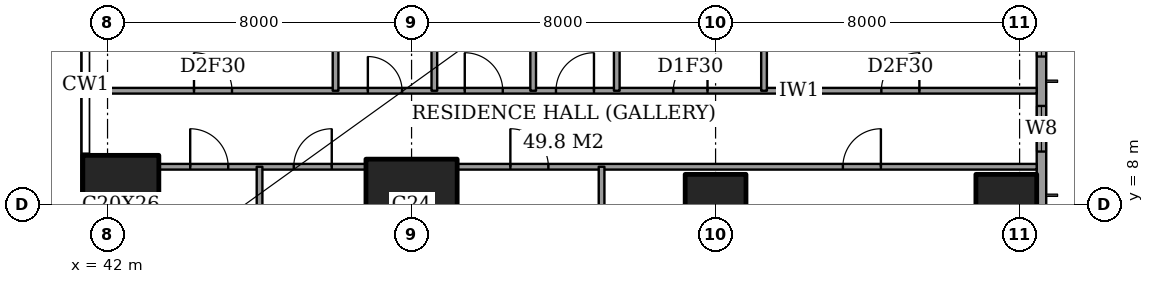
"""IFC4 building model, lengths in metres.
Left out: names, types, materials, properties, quantities, classifications, styles, units other than length and angle.
Written with IfcOpenShell. Run it as: python <this file> out.ifc"""

import sys

from ifc_helpers import new_model, si_unit, direction, frame, frame_2d, origin, origin_2d, place, context, subcontext, project, spatial, rectangle, extrude, element, fill, save


model = new_model("IFC4")
c1 = context("Model", 3, precision=1e-05, world=origin(), true_north=direction((0.0, 1.0)))
c2 = subcontext(c1, "Body", "Model", "MODEL_VIEW")
j1 = project(units=[si_unit("LENGTHUNIT", "METRE"), si_unit("PLANEANGLEUNIT", "RADIAN")], contexts=[c1])
p1 = place(None, origin())
s1 = spatial("IfcSite", under=j1, at=p1, CompositionType="ELEMENT")
p2 = place(p1, origin())
s2 = spatial("IfcBuilding", under=s1, at=p2, CompositionType="ELEMENT")
p3 = place(p2, frame((0.0, 0.0, 237.6)))
s3 = spatial("IfcBuildingStorey", under=s2, at=p3, CompositionType="ELEMENT", Elevation=237.6)
p4 = place(p3, frame((42.35, 8.0, 0.0), z_axis=(0.0, 0.0, 1.0), x_axis=(1.0, 0.0, 0.0)))
e1 = element("IfcColumn", 1, at=p4, inside=s3, PredefinedType="COLUMN", context=c2, shape_type="SweptSolid", body=[
    extrude(rectangle(XDim=2.0, YDim=2.6, at=origin_2d()), origin(), (0.0, 0.0, 1.0), 3.6),
])
p5 = place(p3, frame((50.0, 8.0, 0.0), z_axis=(0.0, 0.0, 1.0), x_axis=(1.0, 0.0, 0.0)))
e2 = element("IfcColumn", 2, at=p5, inside=s3, PredefinedType="COLUMN", context=c2, shape_type="SweptSolid", body=[
    extrude(rectangle(XDim=2.4, YDim=2.4, at=origin_2d()), origin(), (0.0, 0.0, 1.0), 3.6),
])
for number, where, z_axis, x_axis in (
    (3, (58.0, 8.0, 0.0), (0.0, 0.0, 1.0), (1.0, 0.0, 0.0)),
    (4, (65.65, 8.0, 0.0), (0.0, 0.0, 1.0), (1.0, 0.0, 0.0)),
):
    element("IfcColumn", number, at=place(p3, frame(where, z_axis=z_axis, x_axis=x_axis)), inside=s3, PredefinedType="COLUMN", context=c2, shape_type="SweptSolid", body=[
        extrude(rectangle(XDim=1.6, YDim=1.6, at=origin_2d()), origin(), (0.0, 0.0, 1.0), 3.6),
    ])
p6 = place(p3, frame((66.575, 3.175, 0.0), z_axis=(0.0, 0.0, 1.0), x_axis=(0.0, 1.0, 0.0)))
e5 = element("IfcWall", 5, at=p6, inside=s3, PredefinedType="SOLIDWALL", context=c2, shape_type="SweptSolid", body=[
    extrude(rectangle(XDim=41.65, YDim=0.25, at=frame_2d((20.825, 0.0))), origin(), (0.0, 0.0, 1.0), 3.6),
])
p7 = place(p6, frame((0.875, 0.0, 0.6)))
e6 = element("IfcOpeningElement", 6, at=p7, cuts=e5, PredefinedType="OPENING", context=c2, shape_type="SweptSolid", body=[
    extrude(rectangle(XDim=2.4, YDim=2.0, at=frame_2d((1.2, 1.0))), frame((0.0, 0.135, 0.0), z_axis=(0.0, -1.0, 0.0), x_axis=(1.0, 0.0, 0.0)), (0.0, 0.0, 1.0), 0.27),
])
p8 = place(p6, frame((6.225, 0.0, 0.6)))
e7 = element("IfcOpeningElement", 7, at=p8, cuts=e5, PredefinedType="OPENING", context=c2, shape_type="SweptSolid", body=[
    extrude(rectangle(XDim=1.2, YDim=2.0, at=frame_2d((0.6, 1.0))), frame((0.0, 0.135, 0.0), z_axis=(0.0, -1.0, 0.0), x_axis=(1.0, 0.0, 0.0)), (0.0, 0.0, 1.0), 0.27),
])
p9 = place(p6, frame((8.725, 0.0, 0.6)))
e8 = element("IfcOpeningElement", 8, at=p9, cuts=e5, PredefinedType="OPENING", context=c2, shape_type="SweptSolid", body=[
    extrude(rectangle(XDim=2.4, YDim=2.0, at=frame_2d((1.2, 1.0))), frame((0.0, 0.135, 0.0), z_axis=(0.0, -1.0, 0.0), x_axis=(1.0, 0.0, 0.0)), (0.0, 0.0, 1.0), 0.27),
])
p10 = place(p6, frame((15.725, 0.0, 0.6)))
e9 = element("IfcOpeningElement", 9, at=p10, cuts=e5, PredefinedType="OPENING", context=c2, shape_type="SweptSolid", body=[
    extrude(rectangle(XDim=2.4, YDim=2.0, at=frame_2d((1.2, 1.0))), frame((0.0, 0.135, 0.0), z_axis=(0.0, -1.0, 0.0), x_axis=(1.0, 0.0, 0.0)), (0.0, 0.0, 1.0), 0.27),
])
p11 = place(p6, frame((23.525, 0.0, 0.6)))
e10 = element("IfcOpeningElement", 10, at=p11, cuts=e5, PredefinedType="OPENING", context=c2, shape_type="SweptSolid", body=[
    extrude(rectangle(XDim=2.4, YDim=2.0, at=frame_2d((1.2, 1.0))), frame((0.0, 0.135, 0.0), z_axis=(0.0, -1.0, 0.0), x_axis=(1.0, 0.0, 0.0)), (0.0, 0.0, 1.0), 0.27),
])
p12 = place(p6, frame((30.725, 0.0, 0.6)))
e11 = element("IfcOpeningElement", 11, at=p12, cuts=e5, PredefinedType="OPENING", context=c2, shape_type="SweptSolid", body=[
    extrude(rectangle(XDim=2.4, YDim=2.0, at=frame_2d((1.2, 1.0))), frame((0.0, 0.135, 0.0), z_axis=(0.0, -1.0, 0.0), x_axis=(1.0, 0.0, 0.0)), (0.0, 0.0, 1.0), 0.27),
])
p13 = place(p6, frame((34.525, 0.0, 0.6)))
e12 = element("IfcOpeningElement", 12, at=p13, cuts=e5, PredefinedType="OPENING", context=c2, shape_type="SweptSolid", body=[
    extrude(rectangle(XDim=1.2, YDim=2.0, at=frame_2d((0.6, 1.0))), frame((0.0, 0.135, 0.0), z_axis=(0.0, -1.0, 0.0), x_axis=(1.0, 0.0, 0.0)), (0.0, 0.0, 1.0), 0.27),
])
p14 = place(p6, frame((38.375, 0.0, 0.6)))
e13 = element("IfcOpeningElement", 13, at=p14, cuts=e5, PredefinedType="OPENING", context=c2, shape_type="SweptSolid", body=[
    extrude(rectangle(XDim=2.4, YDim=2.0, at=frame_2d((1.2, 1.0))), frame((0.0, 0.135, 0.0), z_axis=(0.0, -1.0, 0.0), x_axis=(1.0, 0.0, 0.0)), (0.0, 0.0, 1.0), 0.27),
])
p15 = place(p3, frame((43.35, 9.0, 0.0), z_axis=(0.0, 0.0, 1.0), x_axis=(1.0, 0.0, 0.0)))
e14 = element("IfcWall", 14, at=p15, inside=s3, PredefinedType="PARTITIONING", context=c2, shape_type="SweptSolid", body=[
    extrude(rectangle(XDim=5.45, YDim=0.15, at=frame_2d((2.725, 0.0))), origin(), (0.0, 0.0, 1.0), 3.35),
])
p16 = place(p15, frame((3.55, 0.0, 0.0)))
e15 = element("IfcOpeningElement", 15, at=p16, cuts=e14, PredefinedType="OPENING", context=c2, shape_type="SweptSolid", body=[
    extrude(rectangle(XDim=1.0, YDim=2.1, at=frame_2d((0.5, 1.05))), frame((0.0, 0.085, 0.0), z_axis=(0.0, -1.0, 0.0), x_axis=(1.0, 0.0, 0.0)), (0.0, 0.0, 1.0), 0.17),
])
p17 = place(p15, frame((0.825, 0.0, 0.0)))
e16 = element("IfcOpeningElement", 16, at=p17, cuts=e14, PredefinedType="OPENING", context=c2, shape_type="SweptSolid", body=[
    extrude(rectangle(XDim=1.0, YDim=2.1, at=frame_2d((0.5, 1.05))), frame((0.0, 0.085, 0.0), z_axis=(0.0, -1.0, 0.0), x_axis=(1.0, 0.0, 0.0)), (0.0, 0.0, 1.0), 0.17),
])
p18 = place(p3, frame((51.2, 9.0, 0.0), z_axis=(0.0, 0.0, 1.0), x_axis=(1.0, 0.0, 0.0)))
e17 = element("IfcWall", 17, at=p18, inside=s3, PredefinedType="PARTITIONING", context=c2, shape_type="SweptSolid", body=[
    extrude(rectangle(XDim=15.25, YDim=0.15, at=frame_2d((7.625, 0.0))), origin(), (0.0, 0.0, 1.0), 3.35),
])
p19 = place(p18, frame((10.15, 0.0, 0.0)))
e18 = element("IfcOpeningElement", 18, at=p19, cuts=e17, PredefinedType="OPENING", context=c2, shape_type="SweptSolid", body=[
    extrude(rectangle(XDim=1.0, YDim=2.1, at=frame_2d((0.5, 1.05))), frame((0.0, 0.085, 0.0), z_axis=(0.0, -1.0, 0.0), x_axis=(1.0, 0.0, 0.0)), (0.0, 0.0, 1.0), 0.17),
])
p20 = place(p18, frame((1.4, 0.0, 0.0)))
e19 = element("IfcOpeningElement", 19, at=p20, cuts=e17, PredefinedType="OPENING", context=c2, shape_type="SweptSolid", body=[
    extrude(rectangle(XDim=1.0, YDim=2.1, at=frame_2d((0.5, 1.05))), frame((0.0, 0.085, 0.0), z_axis=(0.0, -1.0, 0.0), x_axis=(1.0, 0.0, 0.0)), (0.0, 0.0, 1.0), 0.17),
])
p21 = place(p3, frame((41.439, 11.0, 0.0), z_axis=(0.0, 0.0, 1.0), x_axis=(1.0, 0.0, 0.0)))
e20 = element("IfcWall", 20, at=p21, inside=s3, PredefinedType="PARTITIONING", context=c2, shape_type="SweptSolid", body=[
    extrude(rectangle(XDim=25.011, YDim=0.15, at=frame_2d((12.505, 0.0))), origin(), (0.0, 0.0, 1.0), 3.35),
])
p22 = place(p21, frame((12.361, 0.0, 0.0)))
e21 = element("IfcOpeningElement", 21, at=p22, cuts=e20, PredefinedType="OPENING", context=c2, shape_type="SweptSolid", body=[
    extrude(rectangle(XDim=1.0, YDim=2.1, at=frame_2d((0.5, 1.05))), frame((0.0, 0.085, 0.0), z_axis=(0.0, -1.0, 0.0), x_axis=(1.0, 0.0, 0.0)), (0.0, 0.0, 1.0), 0.17),
])
p23 = place(p21, frame((20.924, 0.0, 0.0)))
e22 = element("IfcOpeningElement", 22, at=p23, cuts=e20, PredefinedType="OPENING", context=c2, shape_type="SweptSolid", body=[
    extrude(rectangle(XDim=1.0, YDim=2.1, at=frame_2d((0.5, 1.05))), frame((0.0, 0.085, 0.0), z_axis=(0.0, -1.0, 0.0), x_axis=(1.0, 0.0, 0.0)), (0.0, 0.0, 1.0), 0.17),
])
p24 = place(p21, frame((15.448, 0.0, 0.0)))
e23 = element("IfcOpeningElement", 23, at=p24, cuts=e20, PredefinedType="OPENING", context=c2, shape_type="SweptSolid", body=[
    extrude(rectangle(XDim=0.9, YDim=2.1, at=frame_2d((0.45, 1.05))), frame((0.0, 0.085, 0.0), z_axis=(0.0, -1.0, 0.0), x_axis=(1.0, 0.0, 0.0)), (0.0, 0.0, 1.0), 0.17),
])
p25 = place(p21, frame((9.961, 0.0, 0.0)))
e24 = element("IfcOpeningElement", 24, at=p25, cuts=e20, PredefinedType="OPENING", context=c2, shape_type="SweptSolid", body=[
    extrude(rectangle(XDim=1.0, YDim=2.1, at=frame_2d((0.5, 1.05))), frame((0.0, 0.085, 0.0), z_axis=(0.0, -1.0, 0.0), x_axis=(1.0, 0.0, 0.0)), (0.0, 0.0, 1.0), 0.17),
])
p26 = place(p21, frame((7.411, 0.0, 0.0)))
e25 = element("IfcOpeningElement", 25, at=p26, cuts=e20, PredefinedType="OPENING", context=c2, shape_type="SweptSolid", body=[
    extrude(rectangle(XDim=0.9, YDim=2.1, at=frame_2d((0.45, 1.05))), frame((0.0, 0.085, 0.0), z_axis=(0.0, -1.0, 0.0), x_axis=(1.0, 0.0, 0.0)), (0.0, 0.0, 1.0), 0.17),
])
p27 = place(p21, frame((2.836, 0.0, 0.0)))
e26 = element("IfcOpeningElement", 26, at=p27, cuts=e20, PredefinedType="OPENING", context=c2, shape_type="SweptSolid", body=[
    extrude(rectangle(XDim=1.0, YDim=2.1, at=frame_2d((0.5, 1.05))), frame((0.0, 0.085, 0.0), z_axis=(0.0, -1.0, 0.0), x_axis=(1.0, 0.0, 0.0)), (0.0, 0.0, 1.0), 0.17),
])
p28 = place(p3, frame((46.0, -0.45, 0.0), z_axis=(0.0, 0.0, 1.0), x_axis=(0.0, 1.0, 0.0)))
e27 = element("IfcWall", 27, at=p28, inside=s3, PredefinedType="PARTITIONING", context=c2, shape_type="SweptSolid", body=[
    extrude(rectangle(XDim=9.45, YDim=0.15, at=frame_2d((4.725, 0.0))), origin(), (0.0, 0.0, 1.0), 3.35),
])
p29 = place(p3, frame((48.0, 11.0, 0.0), z_axis=(0.0, 0.0, 1.0), x_axis=(0.0, 1.0, 0.0)))
e28 = element("IfcWall", 28, at=p29, inside=s3, PredefinedType="PARTITIONING", context=c2, shape_type="SweptSolid", body=[
    extrude(rectangle(XDim=6.5, YDim=0.15, at=frame_2d((3.25, 0.0))), origin(), (0.0, 0.0, 1.0), 3.35),
])
p30 = place(p3, frame((50.6, 11.0, 0.0), z_axis=(0.0, 0.0, 1.0), x_axis=(0.0, 1.0, 0.0)))
e29 = element("IfcWall", 29, at=p30, inside=s3, PredefinedType="PARTITIONING", context=c2, shape_type="SweptSolid", body=[
    extrude(rectangle(XDim=3.8, YDim=0.15, at=frame_2d((1.9, 0.0))), origin(), (0.0, 0.0, 1.0), 3.35),
])
p31 = place(p3, frame((53.2, 11.0, 0.0), z_axis=(0.0, 0.0, 1.0), x_axis=(0.0, 1.0, 0.0)))
e30 = element("IfcWall", 30, at=p31, inside=s3, PredefinedType="PARTITIONING", context=c2, shape_type="SweptSolid", body=[
    extrude(rectangle(XDim=6.5, YDim=0.15, at=frame_2d((3.25, 0.0))), origin(), (0.0, 0.0, 1.0), 3.35),
])
p32 = place(p3, frame((55.0, -0.45, 0.0), z_axis=(0.0, 0.0, 1.0), x_axis=(0.0, 1.0, 0.0)))
e31 = element("IfcWall", 31, at=p32, inside=s3, PredefinedType="PARTITIONING", context=c2, shape_type="SweptSolid", body=[
    extrude(rectangle(XDim=9.45, YDim=0.15, at=frame_2d((4.725, 0.0))), origin(), (0.0, 0.0, 1.0), 3.35),
])
p33 = place(p3, frame((55.4, 11.0, 0.0), z_axis=(0.0, 0.0, 1.0), x_axis=(0.0, 1.0, 0.0)))
e32 = element("IfcWall", 32, at=p33, inside=s3, PredefinedType="PARTITIONING", context=c2, shape_type="SweptSolid", body=[
    extrude(rectangle(XDim=10.6, YDim=0.15, at=frame_2d((5.3, 0.0))), origin(), (0.0, 0.0, 1.0), 3.35),
])
p34 = place(p33, frame((8.05, 0.0, 0.0)))
e33 = element("IfcOpeningElement", 33, at=p34, cuts=e32, PredefinedType="OPENING", context=c2, shape_type="SweptSolid", body=[
    extrude(rectangle(XDim=1.0, YDim=2.1, at=frame_2d((0.5, 1.05))), frame((0.0, 0.085, 0.0), z_axis=(0.0, -1.0, 0.0), x_axis=(1.0, 0.0, 0.0)), (0.0, 0.0, 1.0), 0.17),
])
p35 = place(p3, frame((59.275, 11.0, 0.0), z_axis=(0.0, 0.0, 1.0), x_axis=(0.0, 1.0, 0.0)))
e34 = element("IfcWall", 34, at=p35, inside=s3, PredefinedType="PARTITIONING", context=c2, shape_type="SweptSolid", body=[
    extrude(rectangle(XDim=3.8, YDim=0.15, at=frame_2d((1.9, 0.0))), origin(), (0.0, 0.0, 1.0), 3.35),
])
p36 = place(p8, origin())
e35 = element("IfcWindow", 35, at=p36, inside=s3, PartitioningType="SINGLE_PANEL", PredefinedType="WINDOW", context=c2, shape_type="SweptSolid", body=[
    extrude(rectangle(XDim=1.2, YDim=2.0, at=frame_2d((0.6, 1.0))), frame((0.0, 0.03, 0.0), z_axis=(0.0, -1.0, 0.0), x_axis=(1.0, 0.0, 0.0)), (0.0, 0.0, 1.0), 0.06),
])
fill(e7, e35)
p37 = place(p9, origin())
e36 = element("IfcWindow", 36, at=p37, inside=s3, PartitioningType="SINGLE_PANEL", PredefinedType="WINDOW", context=c2, shape_type="SweptSolid", body=[
    extrude(rectangle(XDim=2.4, YDim=2.0, at=frame_2d((1.2, 1.0))), frame((0.0, 0.03, 0.0), z_axis=(0.0, -1.0, 0.0), x_axis=(1.0, 0.0, 0.0)), (0.0, 0.0, 1.0), 0.06),
])
fill(e8, e36)
p38 = place(p19, origin())
e37 = element("IfcDoor", 37, at=p38, inside=s3, OperationType="SINGLE_SWING_LEFT", PredefinedType="DOOR", context=c2, shape_type="SweptSolid", body=[
    extrude(rectangle(XDim=1.0, YDim=2.1, at=frame_2d((0.5, 1.05))), frame((0.0, 0.025, 0.0), z_axis=(0.0, -1.0, 0.0), x_axis=(1.0, 0.0, 0.0)), (0.0, 0.0, 1.0), 0.05),
])
fill(e18, e37)
p39 = place(p20, origin())
e38 = element("IfcDoor", 38, at=p39, inside=s3, OperationType="SINGLE_SWING_RIGHT", PredefinedType="DOOR", context=c2, shape_type="SweptSolid", body=[
    extrude(rectangle(XDim=1.0, YDim=2.1, at=frame_2d((0.5, 1.05))), frame((0.0, 0.025, 0.0), z_axis=(0.0, -1.0, 0.0), x_axis=(1.0, 0.0, 0.0)), (0.0, 0.0, 1.0), 0.05),
])
fill(e19, e38)
p40 = place(p16, origin())
e39 = element("IfcDoor", 39, at=p40, inside=s3, OperationType="SINGLE_SWING_LEFT", PredefinedType="DOOR", context=c2, shape_type="SweptSolid", body=[
    extrude(rectangle(XDim=1.0, YDim=2.1, at=frame_2d((0.5, 1.05))), frame((0.0, 0.025, 0.0), z_axis=(0.0, -1.0, 0.0), x_axis=(1.0, 0.0, 0.0)), (0.0, 0.0, 1.0), 0.05),
])
fill(e15, e39)
p41 = place(p17, origin())
e40 = element("IfcDoor", 40, at=p41, inside=s3, OperationType="SINGLE_SWING_RIGHT", PredefinedType="DOOR", context=c2, shape_type="SweptSolid", body=[
    extrude(rectangle(XDim=1.0, YDim=2.1, at=frame_2d((0.5, 1.05))), frame((0.0, 0.025, 0.0), z_axis=(0.0, -1.0, 0.0), x_axis=(1.0, 0.0, 0.0)), (0.0, 0.0, 1.0), 0.05),
])
fill(e16, e40)
p42 = place(p22, origin())
e41 = element("IfcDoor", 41, at=p42, inside=s3, OperationType="SINGLE_SWING_LEFT", PredefinedType="DOOR", context=c2, shape_type="SweptSolid", body=[
    extrude(rectangle(XDim=1.0, YDim=2.1, at=frame_2d((0.5, 1.05))), frame((0.0, 0.025, 0.0), z_axis=(0.0, -1.0, 0.0), x_axis=(1.0, 0.0, 0.0)), (0.0, 0.0, 1.0), 0.05),
])
fill(e21, e41)
p43 = place(p23, origin())
e42 = element("IfcDoor", 42, at=p43, inside=s3, OperationType="SINGLE_SWING_LEFT", PredefinedType="DOOR", context=c2, shape_type="SweptSolid", body=[
    extrude(rectangle(XDim=1.0, YDim=2.1, at=frame_2d((0.5, 1.05))), frame((0.0, 0.025, 0.0), z_axis=(0.0, -1.0, 0.0), x_axis=(1.0, 0.0, 0.0)), (0.0, 0.0, 1.0), 0.05),
])
fill(e22, e42)
p44 = place(p24, origin())
e43 = element("IfcDoor", 43, at=p44, inside=s3, OperationType="SINGLE_SWING_LEFT", PredefinedType="DOOR", context=c2, shape_type="SweptSolid", body=[
    extrude(rectangle(XDim=0.9, YDim=2.1, at=frame_2d((0.45, 1.05))), frame((0.0, 0.025, 0.0), z_axis=(0.0, -1.0, 0.0), x_axis=(1.0, 0.0, 0.0)), (0.0, 0.0, 1.0), 0.05),
])
fill(e23, e43)
p45 = place(p25, origin())
e44 = element("IfcDoor", 44, at=p45, inside=s3, OperationType="SINGLE_SWING_RIGHT", PredefinedType="DOOR", context=c2, shape_type="SweptSolid", body=[
    extrude(rectangle(XDim=1.0, YDim=2.1, at=frame_2d((0.5, 1.05))), frame((0.0, 0.025, 0.0), z_axis=(0.0, -1.0, 0.0), x_axis=(1.0, 0.0, 0.0)), (0.0, 0.0, 1.0), 0.05),
])
fill(e24, e44)
p46 = place(p26, origin())
e45 = element("IfcDoor", 45, at=p46, inside=s3, OperationType="SINGLE_SWING_RIGHT", PredefinedType="DOOR", context=c2, shape_type="SweptSolid", body=[
    extrude(rectangle(XDim=0.9, YDim=2.1, at=frame_2d((0.45, 1.05))), frame((0.0, 0.025, 0.0), z_axis=(0.0, -1.0, 0.0), x_axis=(1.0, 0.0, 0.0)), (0.0, 0.0, 1.0), 0.05),
])
fill(e25, e45)
p47 = place(p27, origin())
e46 = element("IfcDoor", 46, at=p47, inside=s3, OperationType="SINGLE_SWING_RIGHT", PredefinedType="DOOR", context=c2, shape_type="SweptSolid", body=[
    extrude(rectangle(XDim=1.0, YDim=2.1, at=frame_2d((0.5, 1.05))), frame((0.0, 0.025, 0.0), z_axis=(0.0, -1.0, 0.0), x_axis=(1.0, 0.0, 0.0)), (0.0, 0.0, 1.0), 0.05),
])
fill(e26, e46)
save(model, sys.argv[1])
